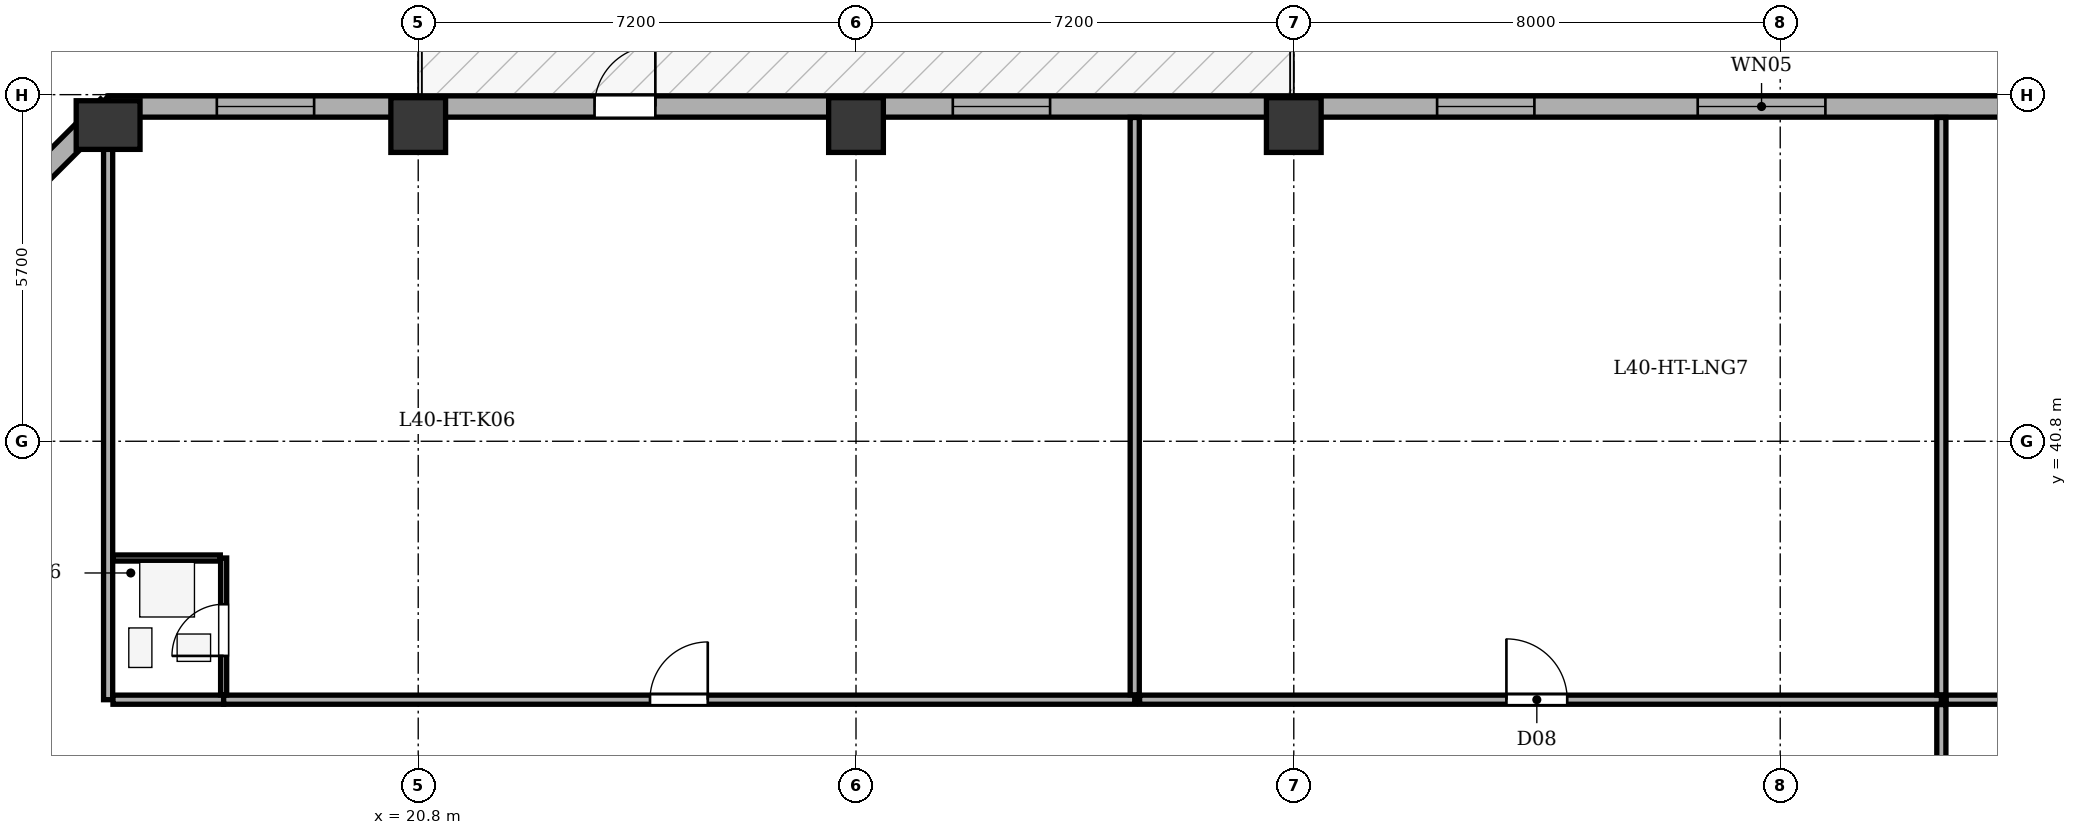
"""IFC4 building model, lengths in metres.
Left out: names, types, materials, properties, quantities, classifications, styles, units other than length and angle.
Written with IfcOpenShell. Run it as: python <this file> out.ifc"""

import sys

from ifc_helpers import new_model, si_unit, direction, frame, frame_2d, origin, origin_2d, place, context, subcontext, project, spatial, rectangle, extrude, element, fill, save


model = new_model("IFC4")
c1 = context("Model", 3, precision=1e-05, world=origin(), true_north=direction((0.0, 1.0)))
c2 = subcontext(c1, "Body", "Model", "MODEL_VIEW")
j1 = project(units=[si_unit("LENGTHUNIT", "METRE"), si_unit("PLANEANGLEUNIT", "RADIAN")], contexts=[c1])
p1 = place(None, origin())
s1 = spatial("IfcSite", under=j1, at=p1, CompositionType="ELEMENT")
p2 = place(p1, origin())
s2 = spatial("IfcBuilding", under=s1, at=p2, CompositionType="ELEMENT")
p3 = place(p2, frame((0.0, 0.0, 158.8)))
s3 = spatial("IfcBuildingStorey", under=s2, at=p3, CompositionType="ELEMENT", Elevation=158.8)
p4 = place(p3, frame((15.7, 46.0, 0.0), z_axis=(0.0, 0.0, 1.0), x_axis=(1.0, 0.0, 0.0)))
e1 = element("IfcColumn", 1, at=p4, inside=s3, PredefinedType="COLUMN", context=c2, shape_type="SweptSolid", body=[
    extrude(rectangle(XDim=0.8, YDim=1.05, at=origin_2d()), origin(), (0.0, 0.0, 1.0), 3.5),
])
for number, where, z_axis, x_axis in (
    (2, (20.8, 46.0, 0.0), (0.0, 0.0, 1.0), (1.0, 0.0, 0.0)),
    (3, (28.0, 46.0, 0.0), (0.0, 0.0, 1.0), (1.0, 0.0, 0.0)),
    (4, (35.2, 46.0, 0.0), (0.0, 0.0, 1.0), (1.0, 0.0, 0.0)),
):
    element("IfcColumn", number, at=place(p3, frame(where, z_axis=z_axis, x_axis=x_axis)), inside=s3, PredefinedType="COLUMN", context=c2, shape_type="SweptSolid", body=[
        extrude(rectangle(XDim=0.9, YDim=0.9, at=origin_2d()), origin(), (0.0, 0.0, 1.0), 3.5),
    ])
p5 = place(p3, frame((10.895, 41.5, 0.0), z_axis=(0.0, 0.0, 1.0), x_axis=(0.707106781187, 0.707106781187, 0.0)))
e5 = element("IfcWall", 5, at=p5, inside=s3, PredefinedType="STANDARD", context=c2, shape_type="SweptSolid", body=[
    extrude(rectangle(XDim=6.795, YDim=0.35, at=frame_2d((3.397, 0.0))), origin(), (0.0, 0.0, 1.0), 2.435),
])
p6 = place(p5, frame((2.698, 0.0, 0.75)))
e6 = element("IfcOpeningElement", 6, at=p6, cuts=e5, PredefinedType="OPENING", context=c2, shape_type="SweptSolid", body=[
    extrude(rectangle(XDim=1.4, YDim=1.565, at=frame_2d((0.7, 0.782))), frame((0.0, 0.185, 0.0), z_axis=(0.0, -1.0, 0.0), x_axis=(1.0, 0.0, 0.0)), (0.0, 0.0, 1.0), 0.37),
])
p7 = place(p3, frame((15.7, 46.305, 0.0), z_axis=(0.0, 0.0, 1.0), x_axis=(1.0, 0.0, 0.0)))
e7 = element("IfcWall", 7, at=p7, inside=s3, PredefinedType="STANDARD", context=c2, shape_type="SweptSolid", body=[
    extrude(rectangle(XDim=35.0, YDim=0.35, at=frame_2d((17.5, 0.0))), origin(), (0.0, 0.0, 1.0), 2.435),
])
p8 = place(p7, frame((8.0, 0.0, 0.0)))
e8 = element("IfcOpeningElement", 8, at=p8, cuts=e7, PredefinedType="OPENING", context=c2, shape_type="SweptSolid", body=[
    extrude(rectangle(XDim=1.0, YDim=2.02, at=frame_2d((0.5, 1.01))), frame((0.0, 0.185, 0.0), z_axis=(0.0, -1.0, 0.0), x_axis=(1.0, 0.0, 0.0)), (0.0, 0.0, 1.0), 0.37),
])
p9 = place(p7, frame((1.788, 0.0, 0.75)))
e9 = element("IfcOpeningElement", 9, at=p9, cuts=e7, PredefinedType="OPENING", context=c2, shape_type="SweptSolid", body=[
    extrude(rectangle(XDim=1.6, YDim=1.565, at=frame_2d((0.8, 0.782))), frame((0.0, 0.185, 0.0), z_axis=(0.0, -1.0, 0.0), x_axis=(1.0, 0.0, 0.0)), (0.0, 0.0, 1.0), 0.37),
])
p10 = place(p7, frame((13.892, 0.0, 0.75)))
e10 = element("IfcOpeningElement", 10, at=p10, cuts=e7, PredefinedType="OPENING", context=c2, shape_type="SweptSolid", body=[
    extrude(rectangle(XDim=1.6, YDim=1.565, at=frame_2d((0.8, 0.782))), frame((0.0, 0.185, 0.0), z_axis=(0.0, -1.0, 0.0), x_axis=(1.0, 0.0, 0.0)), (0.0, 0.0, 1.0), 0.37),
])
p11 = place(p7, frame((21.857, 0.0, 0.75)))
e11 = element("IfcOpeningElement", 11, at=p11, cuts=e7, PredefinedType="OPENING", context=c2, shape_type="SweptSolid", body=[
    extrude(rectangle(XDim=1.6, YDim=1.565, at=frame_2d((0.8, 0.782))), frame((0.0, 0.185, 0.0), z_axis=(0.0, -1.0, 0.0), x_axis=(1.0, 0.0, 0.0)), (0.0, 0.0, 1.0), 0.37),
])
p12 = place(p7, frame((26.143, 0.0, 0.75)))
e12 = element("IfcOpeningElement", 12, at=p12, cuts=e7, PredefinedType="OPENING", context=c2, shape_type="SweptSolid", body=[
    extrude(rectangle(XDim=2.1, YDim=1.565, at=frame_2d((1.05, 0.782))), frame((0.0, 0.185, 0.0), z_axis=(0.0, -1.0, 0.0), x_axis=(1.0, 0.0, 0.0)), (0.0, 0.0, 1.0), 0.37),
])
p13 = place(p7, frame((31.637, 0.0, 0.75)))
e13 = element("IfcOpeningElement", 13, at=p13, cuts=e7, PredefinedType="OPENING", context=c2, shape_type="SweptSolid", body=[
    extrude(rectangle(XDim=1.6, YDim=1.565, at=frame_2d((0.8, 0.782))), frame((0.0, 0.185, 0.0), z_axis=(0.0, -1.0, 0.0), x_axis=(1.0, 0.0, 0.0)), (0.0, 0.0, 1.0), 0.37),
])
p14 = place(p3, frame((15.7, 36.55, 0.0), z_axis=(0.0, 0.0, 1.0), x_axis=(0.0, 1.0, 0.0)))
e14 = element("IfcWall", 14, at=p14, inside=s3, PredefinedType="PARTITIONING", context=c2, shape_type="SweptSolid", body=[
    extrude(rectangle(XDim=9.575, YDim=0.15, at=frame_2d((4.788, 0.0))), origin(), (0.0, 0.0, 1.0), 1.635),
])
p15 = place(p3, frame((15.78, 36.55, 0.0), z_axis=(0.0, 0.0, 1.0), x_axis=(1.0, 0.0, 0.0)))
e15 = element("IfcWall", 15, at=p15, inside=s3, PredefinedType="PARTITIONING", context=c2, shape_type="SweptSolid", body=[
    extrude(rectangle(XDim=1.82, YDim=0.15, at=frame_2d((0.91, 0.0))), origin(), (0.0, 0.0, 1.0), 3.05),
])
p16 = place(p3, frame((17.6, 36.55, 0.0), z_axis=(0.0, 0.0, 1.0), x_axis=(1.0, 0.0, 0.0)))
e16 = element("IfcWall", 16, at=p16, inside=s3, PredefinedType="PARTITIONING", context=c2, shape_type="SweptSolid", body=[
    extrude(rectangle(XDim=14.984, YDim=0.15, at=frame_2d((7.492, 0.0))), origin(), (0.0, 0.0, 1.0), 3.05),
])
p17 = place(p16, frame((7.012, 0.0, 0.0)))
e17 = element("IfcOpeningElement", 17, at=p17, cuts=e16, PredefinedType="OPENING", context=c2, shape_type="SweptSolid", body=[
    extrude(rectangle(XDim=0.95, YDim=2.1, at=frame_2d((0.475, 1.05))), frame((0.0, 0.085, 0.0), z_axis=(0.0, -1.0, 0.0), x_axis=(1.0, 0.0, 0.0)), (0.0, 0.0, 1.0), 0.17),
])
p18 = place(p3, frame((17.6, 36.63, 0.0), z_axis=(0.0, 0.0, 1.0), x_axis=(0.0, 1.0, 0.0)))
e18 = element("IfcWall", 18, at=p18, inside=s3, PredefinedType="PARTITIONING", context=c2, shape_type="SweptSolid", body=[
    extrude(rectangle(XDim=2.25, YDim=0.1, at=frame_2d((1.125, 0.0))), origin(), (0.0, 0.0, 1.0), 3.05),
])
p19 = place(p18, frame((0.64, 0.0, 0.0)))
e19 = element("IfcOpeningElement", 19, at=p19, cuts=e18, PredefinedType="OPENING", context=c2, shape_type="SweptSolid", body=[
    extrude(rectangle(XDim=0.85, YDim=2.05, at=frame_2d((0.425, 1.025))), frame((0.0, 0.06, 0.0), z_axis=(0.0, -1.0, 0.0), x_axis=(1.0, 0.0, 0.0)), (0.0, 0.0, 1.0), 0.12),
])
p20 = place(p3, frame((15.78, 38.88, 0.0), z_axis=(0.0, 0.0, 1.0), x_axis=(1.0, 0.0, 0.0)))
e20 = element("IfcWall", 20, at=p20, inside=s3, PredefinedType="PARTITIONING", context=c2, shape_type="SweptSolid", body=[
    extrude(rectangle(XDim=1.765, YDim=0.1, at=frame_2d((0.882, 0.0))), origin(), (0.0, 0.0, 1.0), 3.05),
])
p21 = place(p3, frame((32.584, 36.63, 0.0), z_axis=(0.0, 0.0, 1.0), x_axis=(0.0, 1.0, 0.0)))
e21 = element("IfcWall", 21, at=p21, inside=s3, PredefinedType="PARTITIONING", context=c2, shape_type="SweptSolid", body=[
    extrude(rectangle(XDim=9.495, YDim=0.15, at=frame_2d((4.748, 0.0))), origin(), (0.0, 0.0, 1.0), 3.05),
])
p22 = place(p3, frame((32.664, 36.55, 0.0), z_axis=(0.0, 0.0, 1.0), x_axis=(1.0, 0.0, 0.0)))
e22 = element("IfcWall", 22, at=p22, inside=s3, PredefinedType="PARTITIONING", context=c2, shape_type="SweptSolid", body=[
    extrude(rectangle(XDim=13.186, YDim=0.15, at=frame_2d((6.593, 0.0))), origin(), (0.0, 0.0, 1.0), 3.05),
])
p23 = place(p22, frame((6.033, 0.0, 0.0)))
e23 = element("IfcOpeningElement", 23, at=p23, cuts=e22, PredefinedType="OPENING", context=c2, shape_type="SweptSolid", body=[
    extrude(rectangle(XDim=1.0, YDim=2.1, at=frame_2d((0.5, 1.05))), frame((0.0, 0.085, 0.0), z_axis=(0.0, -1.0, 0.0), x_axis=(1.0, 0.0, 0.0)), (0.0, 0.0, 1.0), 0.17),
])
p24 = place(p3, frame((45.85, 36.63, 0.0), z_axis=(0.0, 0.0, 1.0), x_axis=(0.0, 1.0, 0.0)))
e24 = element("IfcWall", 24, at=p24, inside=s3, PredefinedType="PARTITIONING", context=c2, shape_type="SweptSolid", body=[
    extrude(rectangle(XDim=9.495, YDim=0.15, at=frame_2d((4.748, 0.0))), origin(), (0.0, 0.0, 1.0), 3.05),
])
p25 = place(p3, frame((45.93, 36.55, 0.0), z_axis=(0.0, 0.0, 1.0), x_axis=(1.0, 0.0, 0.0)))
e25 = element("IfcWall", 25, at=p25, inside=s3, PredefinedType="PARTITIONING", context=c2, shape_type="SweptSolid", body=[
    extrude(rectangle(XDim=9.395, YDim=0.15, at=frame_2d((4.698, 0.0))), origin(), (0.0, 0.0, 1.0), 3.05),
])
p26 = place(p3, frame((45.85, 30.28, 0.0), z_axis=(0.0, 0.0, 1.0), x_axis=(0.0, 1.0, 0.0)))
e26 = element("IfcWall", 26, at=p26, inside=s3, PredefinedType="PARTITIONING", context=c2, shape_type="SweptSolid", body=[
    extrude(rectangle(XDim=6.19, YDim=0.15, at=frame_2d((3.095, 0.0))), origin(), (0.0, 0.0, 1.0), 3.05),
])
p27 = place(p26, frame((2.615, 0.0, 0.0)))
e27 = element("IfcOpeningElement", 27, at=p27, cuts=e26, PredefinedType="OPENING", context=c2, shape_type="SweptSolid", body=[
    extrude(rectangle(XDim=0.95, YDim=2.1, at=frame_2d((0.475, 1.05))), frame((0.0, 0.085, 0.0), z_axis=(0.0, -1.0, 0.0), x_axis=(1.0, 0.0, 0.0)), (0.0, 0.0, 1.0), 0.17),
])
p28 = place(p8, origin())
e28 = element("IfcDoor", 28, at=p28, inside=s3, OperationType="SINGLE_SWING_RIGHT", PredefinedType="DOOR", context=c2, shape_type="SweptSolid", body=[
    extrude(rectangle(XDim=1.0, YDim=2.02, at=frame_2d((0.5, 1.01))), frame((0.0, 0.025, 0.0), z_axis=(0.0, -1.0, 0.0), x_axis=(1.0, 0.0, 0.0)), (0.0, 0.0, 1.0), 0.05),
])
fill(e8, e28)
p29 = place(p9, origin())
e29 = element("IfcWindow", 29, at=p29, inside=s3, PartitioningType="SINGLE_PANEL", PredefinedType="WINDOW", context=c2, shape_type="SweptSolid", body=[
    extrude(rectangle(XDim=1.6, YDim=1.565, at=frame_2d((0.8, 0.782))), frame((0.0, -0.01, 0.0), z_axis=(0.0, -1.0, 0.0), x_axis=(1.0, 0.0, 0.0)), (0.0, 0.0, 1.0), 0.06),
])
fill(e9, e29)
p30 = place(p10, origin())
e30 = element("IfcWindow", 30, at=p30, inside=s3, PartitioningType="SINGLE_PANEL", PredefinedType="WINDOW", context=c2, shape_type="SweptSolid", body=[
    extrude(rectangle(XDim=1.6, YDim=1.565, at=frame_2d((0.8, 0.782))), frame((0.0, -0.01, 0.0), z_axis=(0.0, -1.0, 0.0), x_axis=(1.0, 0.0, 0.0)), (0.0, 0.0, 1.0), 0.06),
])
fill(e10, e30)
p31 = place(p11, origin())
e31 = element("IfcWindow", 31, at=p31, inside=s3, PartitioningType="SINGLE_PANEL", PredefinedType="WINDOW", context=c2, shape_type="SweptSolid", body=[
    extrude(rectangle(XDim=1.6, YDim=1.565, at=frame_2d((0.8, 0.782))), frame((0.0, -0.01, 0.0), z_axis=(0.0, -1.0, 0.0), x_axis=(1.0, 0.0, 0.0)), (0.0, 0.0, 1.0), 0.06),
])
fill(e11, e31)
p32 = place(p12, origin())
e32 = element("IfcWindow", 32, at=p32, inside=s3, PartitioningType="SINGLE_PANEL", PredefinedType="WINDOW", context=c2, shape_type="SweptSolid", body=[
    extrude(rectangle(XDim=2.1, YDim=1.565, at=frame_2d((1.05, 0.782))), frame((0.0, -0.01, 0.0), z_axis=(0.0, -1.0, 0.0), x_axis=(1.0, 0.0, 0.0)), (0.0, 0.0, 1.0), 0.06),
])
fill(e12, e32)
p33 = place(p19, origin())
e33 = element("IfcDoor", 33, at=p33, inside=s3, OperationType="SINGLE_SWING_LEFT", PredefinedType="DOOR", context=c2, shape_type="SweptSolid", body=[
    extrude(rectangle(XDim=0.85, YDim=2.05, at=frame_2d((0.425, 1.025))), frame((0.0, 0.025, 0.0), z_axis=(0.0, -1.0, 0.0), x_axis=(1.0, 0.0, 0.0)), (0.0, 0.0, 1.0), 0.05),
])
fill(e19, e33)
p34 = place(p17, origin())
e34 = element("IfcDoor", 34, at=p34, inside=s3, OperationType="SINGLE_SWING_RIGHT", PredefinedType="DOOR", context=c2, shape_type="SweptSolid", body=[
    extrude(rectangle(XDim=0.95, YDim=2.1, at=frame_2d((0.475, 1.05))), frame((0.0, 0.025, 0.0), z_axis=(0.0, -1.0, 0.0), x_axis=(1.0, 0.0, 0.0)), (0.0, 0.0, 1.0), 0.05),
])
fill(e17, e34)
p35 = place(p23, origin())
e35 = element("IfcDoor", 35, at=p35, inside=s3, OperationType="SINGLE_SWING_LEFT", PredefinedType="DOOR", context=c2, shape_type="SweptSolid", body=[
    extrude(rectangle(XDim=1.0, YDim=2.1, at=frame_2d((0.5, 1.05))), frame((0.0, 0.025, 0.0), z_axis=(0.0, -1.0, 0.0), x_axis=(1.0, 0.0, 0.0)), (0.0, 0.0, 1.0), 0.05),
])
fill(e23, e35)
save(model, sys.argv[1])
